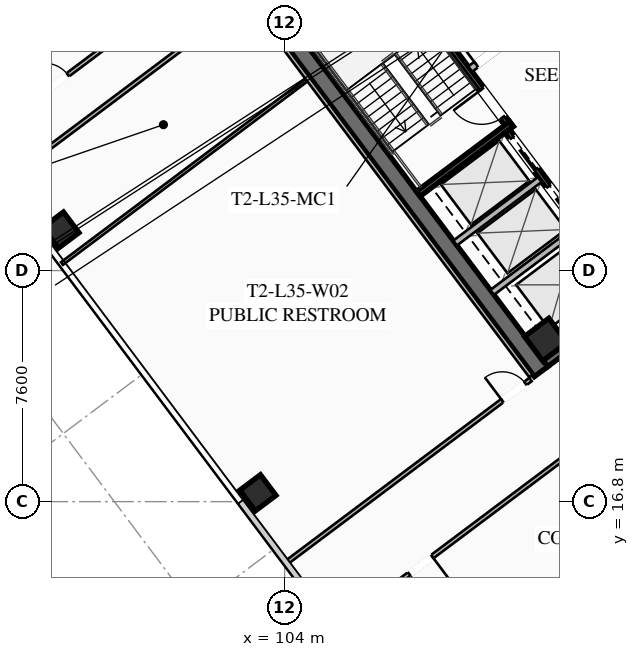
"""IFC4 building model, lengths in metres.
Left out: names, types, materials, properties, quantities, classifications, styles, units other than length and angle.
Written with IfcOpenShell. Run it as: python <this file> out.ifc"""

import sys

from ifc_helpers import new_model, si_unit, direction, frame, frame_2d, origin, origin_2d, place, context, subcontext, project, spatial, rectangle, hollow_rectangle, extrude, element, fill, save


model = new_model("IFC4")
c1 = context("Model", 3, precision=1e-05, world=origin(), true_north=direction((0.0, 1.0)))
c2 = subcontext(c1, "Body", "Model", "MODEL_VIEW")
j1 = project(units=[si_unit("LENGTHUNIT", "METRE"), si_unit("PLANEANGLEUNIT", "RADIAN")], contexts=[c1])
p1 = place(None, origin())
s1 = spatial("IfcSite", under=j1, at=p1, CompositionType="ELEMENT")
p2 = place(p1, origin())
s2 = spatial("IfcBuilding", under=s1, at=p2, CompositionType="ELEMENT")
p3 = place(p2, frame((0.0, 0.0, 132.15)))
s3 = spatial("IfcBuildingStorey", under=s2, at=p3, CompositionType="ELEMENT", Elevation=132.15)
p4 = place(p3, frame((112.436, 21.077, 0.0), z_axis=(0.0, 0.0, 1.0), x_axis=(-0.600005007985, 0.799996243986, 0.0)))
e1 = element("IfcWall", 1, at=p4, inside=s3, PredefinedType="SHEAR", context=c2, shape_type="SweptSolid", body=[
    extrude(rectangle(XDim=15.6, YDim=0.55, at=frame_2d((7.8, 0.0))), origin(), (0.0, 0.0, 1.0), 3.55),
])
p5 = place(p3, frame((124.539, 30.498, 0.0), z_axis=(0.0, 0.0, 1.0), x_axis=(-0.799998054672, -0.600002593761, 0.0)))
e2 = element("IfcWall", 2, at=p5, inside=s3, PredefinedType="SHEAR", context=c2, shape_type="SweptSolid", body=[
    extrude(rectangle(XDim=15.06, YDim=0.55, at=frame_2d((7.53, 0.0))), origin(), (0.0, 0.0, 1.0), 3.55),
])
p6 = place(p5, frame((9.23, 0.0, 0.0)))
e3 = element("IfcOpeningElement", 3, at=p6, cuts=e2, PredefinedType="OPENING", context=c2, shape_type="SweptSolid", body=[
    extrude(rectangle(XDim=1.25, YDim=2.25, at=frame_2d((0.625, 1.125))), frame((0.0, 0.285, 0.0), z_axis=(0.0, -1.0, 0.0), x_axis=(1.0, 0.0, 0.0)), (0.0, 0.0, 1.0), 0.57),
])
p7 = place(p5, frame((4.18, 0.0, 0.0)))
e4 = element("IfcOpeningElement", 4, at=p7, cuts=e2, PredefinedType="OPENING", context=c2, shape_type="SweptSolid", body=[
    extrude(rectangle(XDim=1.25, YDim=2.25, at=frame_2d((0.625, 1.125))), frame((0.0, 0.285, 0.0), z_axis=(0.0, -1.0, 0.0), x_axis=(1.0, 0.0, 0.0)), (0.0, 0.0, 1.0), 0.57),
])
p8 = place(p3, frame((112.59, 22.13, 0.0), z_axis=(0.0, 0.0, 1.0), x_axis=(0.799999996291, 0.600000004945, 0.0)))
e5 = element("IfcColumn", 5, at=p8, inside=s3, PredefinedType="COLUMN", context=c2, shape_type="SweptSolid", body=[
    extrude(hollow_rectangle(XDim=1.0, YDim=1.0, WallThickness=0.04, at=origin_2d()), origin(), (0.0, 0.0, 1.0), 3.37),
])
for number, where, z_axis, x_axis in (
    (6, (96.64, 25.73, 0.0), (0.0, 0.0, 1.0), (0.8, 0.6, 0.0)),
    (7, (103.12, 17.09, 0.0), (0.0, 0.0, 1.0), (0.8, 0.6, 0.0)),
):
    element("IfcColumn", number, at=place(p3, frame(where, z_axis=z_axis, x_axis=x_axis)), inside=s3, PredefinedType="COLUMN", context=c2, shape_type="SweptSolid", body=[
        extrude(hollow_rectangle(XDim=0.85, YDim=0.85, WallThickness=0.035, at=origin_2d()), origin(), (0.0, 0.0, 1.0), 3.37),
    ])
p9 = place(p3, frame((111.44, 29.08, 0.0), z_axis=(0.0, 0.0, 1.0), x_axis=(-0.59999029481, 0.8000072788, 0.0)))
e8 = element("IfcWall", 8, at=p9, inside=s3, PredefinedType="SHEAR", context=c2, shape_type="SweptSolid", body=[
    extrude(rectangle(XDim=8.05, YDim=0.2, at=frame_2d((4.025, 0.0))), origin(), (0.0, 0.0, 1.0), 3.37),
])
p10 = place(p9, frame((0.45, 0.0, 0.0)))
e9 = element("IfcOpeningElement", 9, at=p10, cuts=e8, PredefinedType="OPENING", context=c2, shape_type="SweptSolid", body=[
    extrude(rectangle(XDim=1.15, YDim=2.2, at=frame_2d((0.575, 1.1))), frame((0.0, 0.11, 0.0), z_axis=(0.0, -1.0, 0.0), x_axis=(1.0, 0.0, 0.0)), (0.0, 0.0, 1.0), 0.22),
])
p11 = place(p3, frame((108.396, 26.922, 0.0), z_axis=(0.0, 0.0, 1.0), x_axis=(0.800015298837, 0.599979601008, 0.0)))
e10 = element("IfcWall", 10, at=p11, inside=s3, PredefinedType="SHEAR", context=c2, shape_type="SweptSolid", body=[
    extrude(rectangle(XDim=3.83, YDim=0.2, at=frame_2d((1.915, 0.0))), origin(), (0.0, 0.0, 1.0), 3.37),
])
p12 = place(p3, frame((117.998, 25.936, 0.0), z_axis=(0.0, 0.0, 1.0), x_axis=(-0.600002693989, 0.799997979501, 0.0)))
e11 = element("IfcWall", 11, at=p12, inside=s3, PredefinedType="SHEAR", context=c2, shape_type="SweptSolid", body=[
    extrude(rectangle(XDim=14.5, YDim=0.2, at=frame_2d((7.25, 0.0))), origin(), (0.0, 0.0, 1.0), 3.37),
])
p13 = place(p3, frame((110.104, 31.028, 0.0), z_axis=(0.0, 0.0, 1.0), x_axis=(0.800018601094, 0.59997519774, 0.0)))
e12 = element("IfcWall", 12, at=p13, inside=s3, PredefinedType="SOLIDWALL", context=c2, shape_type="SweptSolid", body=[
    extrude(rectangle(XDim=3.15, YDim=0.22, at=frame_2d((1.575, 0.0))), origin(), (0.0, 0.0, 1.0), 2.723),
])
p14 = place(p13, frame((0.25, 0.0, 0.0)))
e13 = element("IfcOpeningElement", 13, at=p14, cuts=e12, PredefinedType="OPENING", context=c2, shape_type="SweptSolid", body=[
    extrude(rectangle(XDim=0.95, YDim=2.05, at=frame_2d((0.475, 1.025))), frame((0.0, 0.12, 0.0), z_axis=(0.0, -1.0, 0.0), x_axis=(1.0, 0.0, 0.0)), (0.0, 0.0, 1.0), 0.24),
])
p15 = place(p13, frame((1.95, 0.0, 0.0)))
e14 = element("IfcOpeningElement", 14, at=p15, cuts=e12, PredefinedType="OPENING", context=c2, shape_type="SweptSolid", body=[
    extrude(rectangle(XDim=0.95, YDim=2.05, at=frame_2d((0.475, 1.025))), frame((0.0, 0.12, 0.0), z_axis=(0.0, -1.0, 0.0), x_axis=(1.0, 0.0, 0.0)), (0.0, 0.0, 1.0), 0.24),
])
p16 = place(p3, frame((115.19, 23.83, 0.0), z_axis=(0.0, 0.0, 1.0), x_axis=(-0.599993943644, 0.800004542231, 0.0)))
e15 = element("IfcWall", 15, at=p16, inside=s3, PredefinedType="SHEAR", context=c2, shape_type="SweptSolid", body=[
    extrude(rectangle(XDim=6.45, YDim=0.2, at=frame_2d((3.225, 0.0))), origin(), (0.0, 0.0, 1.0), 3.37),
])
p17 = place(p16, frame((4.875, 0.0, 0.0)))
e16 = element("IfcOpeningElement", 16, at=p17, cuts=e15, PredefinedType="OPENING", context=c2, shape_type="SweptSolid", body=[
    extrude(rectangle(XDim=1.3, YDim=2.25, at=frame_2d((0.65, 1.125))), frame((0.0, 0.11, 0.0), z_axis=(0.0, -1.0, 0.0), x_axis=(1.0, 0.0, 0.0)), (0.0, 0.0, 1.0), 0.22),
])
p18 = place(p16, frame((2.875, 0.0, 0.0)))
e17 = element("IfcOpeningElement", 17, at=p18, cuts=e15, PredefinedType="OPENING", context=c2, shape_type="SweptSolid", body=[
    extrude(rectangle(XDim=1.3, YDim=2.25, at=frame_2d((0.65, 1.125))), frame((0.0, 0.11, 0.0), z_axis=(0.0, -1.0, 0.0), x_axis=(1.0, 0.0, 0.0)), (0.0, 0.0, 1.0), 0.22),
])
p19 = place(p16, frame((0.675, 0.0, 0.0)))
e18 = element("IfcOpeningElement", 18, at=p19, cuts=e15, PredefinedType="OPENING", context=c2, shape_type="SweptSolid", body=[
    extrude(rectangle(XDim=1.3, YDim=2.25, at=frame_2d((0.65, 1.125))), frame((0.0, 0.11, 0.0), z_axis=(0.0, -1.0, 0.0), x_axis=(1.0, 0.0, 0.0)), (0.0, 0.0, 1.0), 0.22),
])
for number, where, z_axis, x_axis in (
    (19, (110.826, 23.682, 0.0), (0.0, 0.0, 1.0), (0.8, 0.6, 0.0)),
    (20, (109.608, 25.306, 0.0), (0.0, 0.0, 1.0), (0.8, 0.6, 0.0)),
):
    element("IfcWall", number, at=place(p3, frame(where, z_axis=z_axis, x_axis=x_axis)), inside=s3, PredefinedType="SOLIDWALL", context=c2, shape_type="SweptSolid", body=[
        extrude(rectangle(XDim=3.48, YDim=0.2, at=frame_2d((1.74, 0.0))), origin(), (0.0, 0.0, 1.0), 3.37),
    ])
p20 = place(p3, frame((95.87, 30.09, 0.0), z_axis=(0.0, 0.0, 1.0), x_axis=(0.799997191971, 0.600003744021, 0.0)))
e21 = element("IfcWall", 21, at=p20, inside=s3, PredefinedType="PARTITIONING", context=c2, shape_type="SweptSolid", body=[
    extrude(rectangle(XDim=31.3, YDim=0.135, at=frame_2d((15.65, 0.0))), origin(), (0.0, 0.0, 1.0), 2.723),
])
p21 = place(p20, frame((0.3, 0.0, 0.0)))
e22 = element("IfcOpeningElement", 22, at=p21, cuts=e21, PredefinedType="OPENING", context=c2, shape_type="SweptSolid", body=[
    extrude(rectangle(XDim=0.95, YDim=2.05, at=frame_2d((0.475, 1.025))), frame((0.0, 0.077, 0.0), z_axis=(0.0, -1.0, 0.0), x_axis=(1.0, 0.0, 0.0)), (0.0, 0.0, 1.0), 0.155),
])
p22 = place(p20, frame((11.202, 0.0, 0.0)))
e23 = element("IfcOpeningElement", 23, at=p22, cuts=e21, PredefinedType="OPENING", context=c2, shape_type="SweptSolid", body=[
    extrude(rectangle(XDim=0.95, YDim=2.05, at=frame_2d((0.475, 1.025))), frame((0.0, 0.077, 0.0), z_axis=(0.0, -1.0, 0.0), x_axis=(1.0, 0.0, 0.0)), (0.0, 0.0, 1.0), 0.155),
])
p23 = place(p20, frame((15.474, 0.0, 0.0)))
e24 = element("IfcOpeningElement", 24, at=p23, cuts=e21, PredefinedType="OPENING", context=c2, shape_type="SweptSolid", body=[
    extrude(rectangle(XDim=0.95, YDim=2.05, at=frame_2d((0.475, 1.025))), frame((0.0, 0.077, 0.0), z_axis=(0.0, -1.0, 0.0), x_axis=(1.0, 0.0, 0.0)), (0.0, 0.0, 1.0), 0.155),
])
p24 = place(p20, frame((30.05, 0.0, 0.0)))
e25 = element("IfcOpeningElement", 25, at=p24, cuts=e21, PredefinedType="OPENING", context=c2, shape_type="SweptSolid", body=[
    extrude(rectangle(XDim=0.95, YDim=2.05, at=frame_2d((0.475, 1.025))), frame((0.0, 0.077, 0.0), z_axis=(0.0, -1.0, 0.0), x_axis=(1.0, 0.0, 0.0)), (0.0, 0.0, 1.0), 0.155),
])
p25 = place(p3, frame((132.832, 32.974, 0.0), z_axis=(0.0, 0.0, 1.0), x_axis=(-0.8, -0.6, 0.0)))
e26 = element("IfcWall", 26, at=p25, inside=s3, PredefinedType="PARTITIONING", context=c2, shape_type="SweptSolid", body=[
    extrude(rectangle(XDim=31.3, YDim=0.135, at=frame_2d((15.65, 0.0))), origin(), (0.0, 0.0, 1.0), 2.723),
])
p26 = place(p25, frame((29.97, 0.0, 0.0)))
e27 = element("IfcOpeningElement", 27, at=p26, cuts=e26, PredefinedType="OPENING", context=c2, shape_type="SweptSolid", body=[
    extrude(rectangle(XDim=0.95, YDim=2.05, at=frame_2d((0.475, 1.025))), frame((0.0, 0.077, 0.0), z_axis=(0.0, -1.0, 0.0), x_axis=(1.0, 0.0, 0.0)), (0.0, 0.0, 1.0), 0.155),
])
p27 = place(p25, frame((15.053, 0.0, 0.0)))
e28 = element("IfcOpeningElement", 28, at=p27, cuts=e26, PredefinedType="OPENING", context=c2, shape_type="SweptSolid", body=[
    extrude(rectangle(XDim=0.95, YDim=2.05, at=frame_2d((0.475, 1.025))), frame((0.0, 0.077, 0.0), z_axis=(0.0, -1.0, 0.0), x_axis=(1.0, 0.0, 0.0)), (0.0, 0.0, 1.0), 0.155),
])
p28 = place(p25, frame((0.38, 0.0, 0.0)))
e29 = element("IfcOpeningElement", 29, at=p28, cuts=e26, PredefinedType="OPENING", context=c2, shape_type="SweptSolid", body=[
    extrude(rectangle(XDim=0.95, YDim=2.05, at=frame_2d((0.475, 1.025))), frame((0.0, 0.077, 0.0), z_axis=(0.0, -1.0, 0.0), x_axis=(1.0, 0.0, 0.0)), (0.0, 0.0, 1.0), 0.155),
])
p29 = place(p3, frame((112.104, 20.928, 0.0), z_axis=(0.0, 0.0, 1.0), x_axis=(-0.599994940075, 0.800003794918, 0.0)))
e30 = element("IfcWall", 30, at=p29, inside=s3, PredefinedType="PARTITIONING", context=c2, shape_type="SweptSolid", body=[
    extrude(rectangle(XDim=15.44, YDim=0.135, at=frame_2d((7.72, 0.0))), origin(), (0.0, 0.0, 1.0), 2.723),
])
p30 = place(p3, frame((102.728, 33.296, 0.0), z_axis=(0.0, 0.0, 1.0), x_axis=(-0.800002918023, -0.599996109283, 0.0)))
e31 = element("IfcWall", 31, at=p30, inside=s3, PredefinedType="PARTITIONING", context=c2, shape_type="SweptSolid", body=[
    extrude(rectangle(XDim=10.04, YDim=0.135, at=frame_2d((5.02, 0.0))), origin(), (0.0, 0.0, 1.0), 2.723),
])
p31 = place(p30, frame((0.5, 0.0, 0.0)))
e32 = element("IfcOpeningElement", 32, at=p31, cuts=e31, PredefinedType="OPENING", context=c2, shape_type="SweptSolid", body=[
    extrude(rectangle(XDim=0.95, YDim=2.05, at=frame_2d((0.475, 1.025))), frame((0.0, 0.077, 0.0), z_axis=(0.0, -1.0, 0.0), x_axis=(1.0, 0.0, 0.0)), (0.0, 0.0, 1.0), 0.155),
])
p32 = place(p3, frame((104.056, 14.792, 0.0), z_axis=(0.0, 0.0, 1.0), x_axis=(0.800002918023, 0.599996109283, 0.0)))
e33 = element("IfcWall", 33, at=p32, inside=s3, PredefinedType="PARTITIONING", context=c2, shape_type="SweptSolid", body=[
    extrude(rectangle(XDim=10.04, YDim=0.135, at=frame_2d((5.02, 0.0))), origin(), (0.0, 0.0, 1.0), 2.723),
])
p33 = place(p32, frame((8.88, 0.0, 0.0)))
e34 = element("IfcOpeningElement", 34, at=p33, cuts=e33, PredefinedType="OPENING", context=c2, shape_type="SweptSolid", body=[
    extrude(rectangle(XDim=0.95, YDim=2.05, at=frame_2d((0.475, 1.025))), frame((0.0, 0.077, 0.0), z_axis=(0.0, -1.0, 0.0), x_axis=(1.0, 0.0, 0.0)), (0.0, 0.0, 1.0), 0.155),
])
p34 = place(p3, frame((96.676, 24.632, 0.0), z_axis=(0.0, 0.0, 1.0), x_axis=(0.800002918023, 0.599996109283, 0.0)))
e35 = element("IfcWall", 35, at=p34, inside=s3, PredefinedType="PARTITIONING", context=c2, shape_type="SweptSolid", body=[
    extrude(rectangle(XDim=10.04, YDim=0.11, at=frame_2d((5.02, 0.0))), origin(), (0.0, 0.0, 1.0), 2.723),
])
p35 = place(p10, origin())
e36 = element("IfcDoor", 36, at=p35, inside=s3, OperationType="SINGLE_SWING_RIGHT", PredefinedType="DOOR", context=c2, shape_type="SweptSolid", body=[
    extrude(rectangle(XDim=1.15, YDim=2.2, at=frame_2d((0.575, 1.1))), frame((0.0, 0.025, 0.0), z_axis=(0.0, -1.0, 0.0), x_axis=(1.0, 0.0, 0.0)), (0.0, 0.0, 1.0), 0.05),
])
fill(e9, e36)
p36 = place(p14, origin())
e37 = element("IfcDoor", 37, at=p36, inside=s3, OperationType="SINGLE_SWING_LEFT", PredefinedType="DOOR", context=c2, shape_type="SweptSolid", body=[
    extrude(rectangle(XDim=0.95, YDim=2.05, at=frame_2d((0.475, 1.025))), frame((0.0, 0.025, 0.0), z_axis=(0.0, -1.0, 0.0), x_axis=(1.0, 0.0, 0.0)), (0.0, 0.0, 1.0), 0.05),
])
fill(e13, e37)
p37 = place(p21, origin())
e38 = element("IfcDoor", 38, at=p37, inside=s3, OperationType="SINGLE_SWING_LEFT", PredefinedType="DOOR", context=c2, shape_type="SweptSolid", body=[
    extrude(rectangle(XDim=0.95, YDim=2.05, at=frame_2d((0.475, 1.025))), frame((0.0, 0.025, 0.0), z_axis=(0.0, -1.0, 0.0), x_axis=(1.0, 0.0, 0.0)), (0.0, 0.0, 1.0), 0.05),
])
fill(e22, e38)
p38 = place(p26, origin())
e39 = element("IfcDoor", 39, at=p38, inside=s3, OperationType="SINGLE_SWING_LEFT", PredefinedType="DOOR", context=c2, shape_type="SweptSolid", body=[
    extrude(rectangle(XDim=0.95, YDim=2.05, at=frame_2d((0.475, 1.025))), frame((0.0, 0.025, 0.0), z_axis=(0.0, -1.0, 0.0), x_axis=(1.0, 0.0, 0.0)), (0.0, 0.0, 1.0), 0.05),
])
fill(e27, e39)
p39 = place(p33, origin())
e40 = element("IfcDoor", 40, at=p39, inside=s3, OperationType="SINGLE_SWING_LEFT", PredefinedType="DOOR", context=c2, shape_type="SweptSolid", body=[
    extrude(rectangle(XDim=0.95, YDim=2.05, at=frame_2d((0.475, 1.025))), frame((0.0, 0.025, 0.0), z_axis=(0.0, -1.0, 0.0), x_axis=(1.0, 0.0, 0.0)), (0.0, 0.0, 1.0), 0.05),
])
fill(e34, e40)
p40 = place(p17, origin())
e41 = element("IfcDoor", 41, at=p40, inside=s3, OperationType="SLIDING_TO_LEFT", PredefinedType="DOOR", context=c2, shape_type="SweptSolid", body=[
    extrude(rectangle(XDim=1.3, YDim=2.25, at=frame_2d((0.65, 1.125))), frame((0.0, 0.025, 0.0), z_axis=(0.0, -1.0, 0.0), x_axis=(1.0, 0.0, 0.0)), (0.0, 0.0, 1.0), 0.05),
])
fill(e16, e41)
p41 = place(p18, origin())
e42 = element("IfcDoor", 42, at=p41, inside=s3, OperationType="SLIDING_TO_LEFT", PredefinedType="DOOR", context=c2, shape_type="SweptSolid", body=[
    extrude(rectangle(XDim=1.3, YDim=2.25, at=frame_2d((0.65, 1.125))), frame((0.0, 0.025, 0.0), z_axis=(0.0, -1.0, 0.0), x_axis=(1.0, 0.0, 0.0)), (0.0, 0.0, 1.0), 0.05),
])
fill(e17, e42)
save(model, sys.argv[1])
